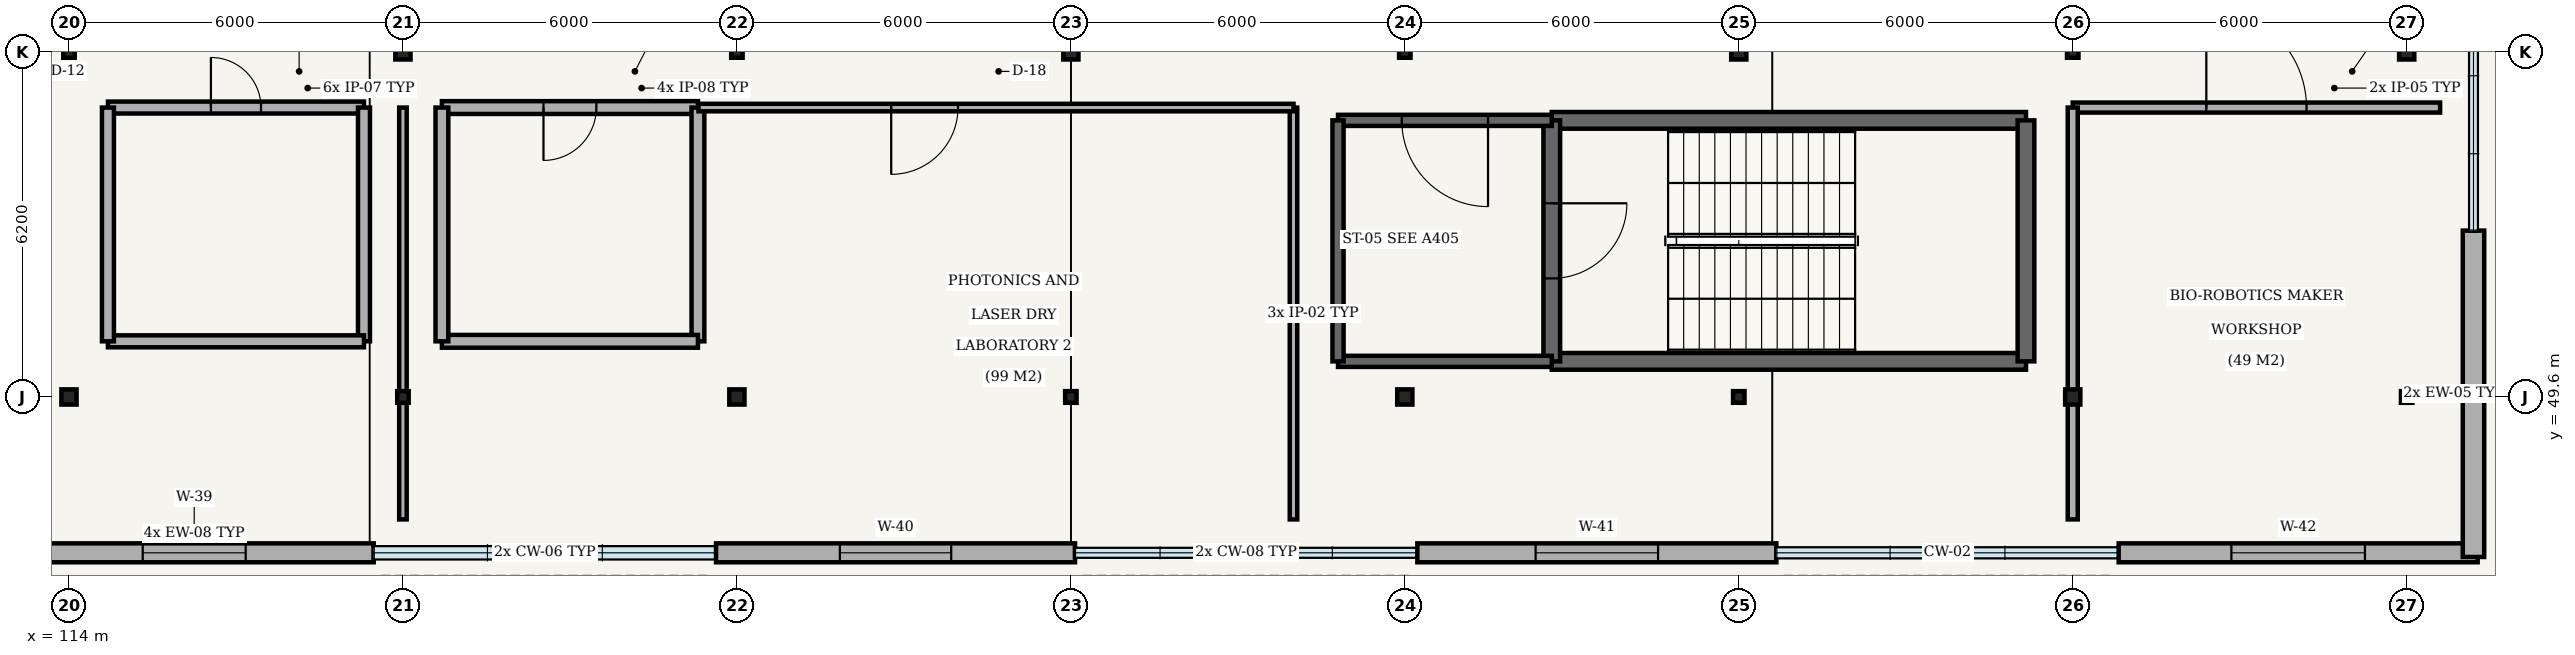
"""IFC4 building model, lengths in metres.
Left out: names, types, materials, properties, quantities, classifications, styles, units other than length and angle.
Written with IfcOpenShell. Run it as: python <this file> out.ifc"""

import sys

from ifc_helpers import new_model, si_unit, direction, frame, frame_2d, origin, origin_2d, place, context, subcontext, project, spatial, rectangle, hollow_circle, i_section, extrude, element, fill, save


model = new_model("IFC4")
c1 = context("Model", 3, precision=1e-05, world=origin(), true_north=direction((0.0, 1.0)))
c2 = subcontext(c1, "Body", "Model", "MODEL_VIEW")
j1 = project(units=[si_unit("LENGTHUNIT", "METRE"), si_unit("PLANEANGLEUNIT", "RADIAN")], contexts=[c1])
p1 = place(None, origin())
s1 = spatial("IfcSite", under=j1, at=p1, CompositionType="ELEMENT")
p2 = place(p1, origin())
s2 = spatial("IfcBuilding", under=s1, at=p2, CompositionType="ELEMENT")
p3 = place(p2, frame((0.0, 0.0, 15.6)))
s3 = spatial("IfcBuildingStorey", under=s2, at=p3, CompositionType="ELEMENT", Elevation=15.6)
p4 = place(p3, frame((114.0, 49.6, 0.0), z_axis=(0.0, 0.0, 1.0), x_axis=(1.0, 0.0, 0.0)))
e1 = element("IfcColumn", 1, at=p4, inside=s3, PredefinedType="COLUMN", context=c2, shape_type="SweptSolid", body=[
    extrude(hollow_circle(Radius=0.136, WallThickness=0.01, at=origin_2d()), origin(), (0.0, 0.0, 1.0), 4.8),
])
for number, where, z_axis, x_axis in (
    (2, (114.0, 55.8, 0.0), (0.0, 0.0, 1.0), (1.0, 0.0, 0.0)),
    (3, (120.0, 49.6, 0.0), (0.0, 0.0, 1.0), (1.0, 0.0, 0.0)),
):
    element("IfcColumn", number, at=place(p3, frame(where, z_axis=z_axis, x_axis=x_axis)), inside=s3, PredefinedType="COLUMN", context=c2, shape_type="SweptSolid", body=[
        extrude(i_section(OverallWidth=0.206, OverallDepth=0.21, WebThickness=0.01, FlangeThickness=0.014, FilletRadius=0.01, at=origin_2d()), origin(), (0.0, 0.0, 1.0), 4.8),
    ])
for number, where, z_axis, x_axis in (
    (4, (120.0, 55.8, 0.0), (0.0, 0.0, 1.0), (1.0, 0.0, 0.0)),
    (5, (126.0, 49.6, 0.0), (0.0, 0.0, 1.0), (1.0, 0.0, 0.0)),
):
    element("IfcColumn", number, at=place(p3, frame(where, z_axis=z_axis, x_axis=x_axis)), inside=s3, PredefinedType="COLUMN", context=c2, shape_type="SweptSolid", body=[
        extrude(hollow_circle(Radius=0.136, WallThickness=0.01, at=origin_2d()), origin(), (0.0, 0.0, 1.0), 4.8),
    ])
for number, where, z_axis, x_axis in (
    (6, (126.0, 55.8, 0.0), (0.0, 0.0, 1.0), (1.0, 0.0, 0.0)),
    (7, (132.0, 49.6, 0.0), (0.0, 0.0, 1.0), (1.0, 0.0, 0.0)),
):
    element("IfcColumn", number, at=place(p3, frame(where, z_axis=z_axis, x_axis=x_axis)), inside=s3, PredefinedType="COLUMN", context=c2, shape_type="SweptSolid", body=[
        extrude(i_section(OverallWidth=0.206, OverallDepth=0.21, WebThickness=0.01, FlangeThickness=0.014, FilletRadius=0.01, at=origin_2d()), origin(), (0.0, 0.0, 1.0), 4.8),
    ])
for number, where, z_axis, x_axis in (
    (8, (132.0, 55.8, 0.0), (0.0, 0.0, 1.0), (1.0, 0.0, 0.0)),
    (9, (138.0, 49.6, 0.0), (0.0, 0.0, 1.0), (1.0, 0.0, 0.0)),
):
    element("IfcColumn", number, at=place(p3, frame(where, z_axis=z_axis, x_axis=x_axis)), inside=s3, PredefinedType="COLUMN", context=c2, shape_type="SweptSolid", body=[
        extrude(hollow_circle(Radius=0.136, WallThickness=0.01, at=origin_2d()), origin(), (0.0, 0.0, 1.0), 4.8),
    ])
for number, where, z_axis, x_axis in (
    (10, (138.0, 55.8, 0.0), (0.0, 0.0, 1.0), (1.0, 0.0, 0.0)),
    (11, (144.0, 49.6, 0.0), (0.0, 0.0, 1.0), (1.0, 0.0, 0.0)),
):
    element("IfcColumn", number, at=place(p3, frame(where, z_axis=z_axis, x_axis=x_axis)), inside=s3, PredefinedType="COLUMN", context=c2, shape_type="SweptSolid", body=[
        extrude(i_section(OverallWidth=0.206, OverallDepth=0.21, WebThickness=0.01, FlangeThickness=0.014, FilletRadius=0.01, at=origin_2d()), origin(), (0.0, 0.0, 1.0), 4.8),
    ])
for number, where, z_axis, x_axis in (
    (12, (144.0, 55.8, 0.0), (0.0, 0.0, 1.0), (1.0, 0.0, 0.0)),
    (13, (150.0, 49.6, 0.0), (0.0, 0.0, 1.0), (1.0, 0.0, 0.0)),
):
    element("IfcColumn", number, at=place(p3, frame(where, z_axis=z_axis, x_axis=x_axis)), inside=s3, PredefinedType="COLUMN", context=c2, shape_type="SweptSolid", body=[
        extrude(hollow_circle(Radius=0.136, WallThickness=0.01, at=origin_2d()), origin(), (0.0, 0.0, 1.0), 4.8),
    ])
p5 = place(p3, frame((150.0, 55.8, 0.0), z_axis=(0.0, 0.0, 1.0), x_axis=(1.0, 0.0, 0.0)))
e14 = element("IfcColumn", 14, at=p5, inside=s3, PredefinedType="COLUMN", context=c2, shape_type="SweptSolid", body=[
    extrude(i_section(OverallWidth=0.206, OverallDepth=0.21, WebThickness=0.01, FlangeThickness=0.014, FilletRadius=0.01, at=origin_2d()), origin(), (0.0, 0.0, 1.0), 4.8),
])
p6 = place(p3, frame((156.0, 49.6, 0.0), z_axis=(0.0, 0.0, 1.0), x_axis=(1.0, 0.0, 0.0)))
e15 = element("IfcColumn", 15, at=p6, inside=s3, PredefinedType="COLUMN", context=c2, shape_type="SweptSolid", body=[
    extrude(i_section(OverallWidth=0.206, OverallDepth=0.21, WebThickness=0.01, FlangeThickness=0.014, FilletRadius=0.01, at=origin_2d()), origin(), (0.0, 0.0, 1.0), 4.55),
])
p7 = place(p3, frame((156.0, 55.8, 0.0), z_axis=(0.0, 0.0, 1.0), x_axis=(1.0, 0.0, 0.0)))
e16 = element("IfcColumn", 16, at=p7, inside=s3, PredefinedType="COLUMN", context=c2, shape_type="SweptSolid", body=[
    extrude(hollow_circle(Radius=0.136, WallThickness=0.01, at=origin_2d()), origin(), (0.0, 0.0, 1.0), 4.55),
])
p8 = place(p3, frame((113.025, 46.8, 0.0), z_axis=(0.0, 0.0, 1.0), x_axis=(1.0, 0.0, 0.0)))
e17 = element("IfcWall", 17, at=p8, inside=s3, PredefinedType="SOLIDWALL", context=c2, shape_type="SweptSolid", body=[
    extrude(rectangle(XDim=6.45, YDim=0.34, at=frame_2d((3.225, 0.0))), origin(), (0.0, 0.0, 1.0), 3.84),
])
p9 = place(p8, frame((2.3, 0.0, 0.9)))
e18 = element("IfcOpeningElement", 18, at=p9, cuts=e17, PredefinedType="OPENING", context=c2, shape_type="SweptSolid", body=[
    extrude(rectangle(XDim=1.85, YDim=1.95, at=frame_2d((0.925, 0.975))), frame((0.0, 0.18, 0.0), z_axis=(0.0, -1.0, 0.0), x_axis=(1.0, 0.0, 0.0)), (0.0, 0.0, 1.0), 0.36),
])
p10 = place(p3, frame((125.625, 46.8, 0.0), z_axis=(0.0, 0.0, 1.0), x_axis=(1.0, 0.0, 0.0)))
e19 = element("IfcWall", 19, at=p10, inside=s3, PredefinedType="SOLIDWALL", context=c2, shape_type="SweptSolid", body=[
    extrude(rectangle(XDim=6.45, YDim=0.34, at=frame_2d((3.225, 0.0))), origin(), (0.0, 0.0, 1.0), 3.84),
])
p11 = place(p10, frame((2.225, 0.0, 0.9)))
e20 = element("IfcOpeningElement", 20, at=p11, cuts=e19, PredefinedType="OPENING", context=c2, shape_type="SweptSolid", body=[
    extrude(rectangle(XDim=2.0, YDim=1.95, at=frame_2d((1.0, 0.975))), frame((0.0, 0.18, 0.0), z_axis=(0.0, -1.0, 0.0), x_axis=(1.0, 0.0, 0.0)), (0.0, 0.0, 1.0), 0.36),
])
p12 = place(p3, frame((138.225, 46.8, 0.0), z_axis=(0.0, 0.0, 1.0), x_axis=(1.0, 0.0, 0.0)))
e21 = element("IfcWall", 21, at=p12, inside=s3, PredefinedType="SOLIDWALL", context=c2, shape_type="SweptSolid", body=[
    extrude(rectangle(XDim=6.45, YDim=0.34, at=frame_2d((3.225, 0.0))), origin(), (0.0, 0.0, 1.0), 3.84),
])
p13 = place(p12, frame((2.125, 0.0, 0.9)))
e22 = element("IfcOpeningElement", 22, at=p13, cuts=e21, PredefinedType="OPENING", context=c2, shape_type="SweptSolid", body=[
    extrude(rectangle(XDim=2.2, YDim=1.95, at=frame_2d((1.1, 0.975))), frame((0.0, 0.18, 0.0), z_axis=(0.0, -1.0, 0.0), x_axis=(1.0, 0.0, 0.0)), (0.0, 0.0, 1.0), 0.36),
])
p14 = place(p3, frame((150.825, 46.8, 0.0), z_axis=(0.0, 0.0, 1.0), x_axis=(1.0, 0.0, 0.0)))
e23 = element("IfcWall", 23, at=p14, inside=s3, PredefinedType="SOLIDWALL", context=c2, shape_type="SweptSolid", body=[
    extrude(rectangle(XDim=6.45, YDim=0.34, at=frame_2d((3.225, 0.0))), origin(), (0.0, 0.0, 1.0), 3.84),
])
p15 = place(p14, frame((2.025, 0.0, 0.9)))
e24 = element("IfcOpeningElement", 24, at=p15, cuts=e23, PredefinedType="OPENING", context=c2, shape_type="SweptSolid", body=[
    extrude(rectangle(XDim=2.4, YDim=1.95, at=frame_2d((1.2, 0.975))), frame((0.0, 0.18, 0.0), z_axis=(0.0, -1.0, 0.0), x_axis=(1.0, 0.0, 0.0)), (0.0, 0.0, 1.0), 0.36),
])
p16 = place(p3, frame((157.2, 46.725, 0.0), z_axis=(0.0, 0.0, 1.0), x_axis=(0.0, 1.0, 0.0)))
e25 = element("IfcWall", 25, at=p16, inside=s3, PredefinedType="SOLIDWALL", context=c2, shape_type="SweptSolid", body=[
    extrude(rectangle(XDim=5.864, YDim=0.385, at=frame_2d((2.932, 0.0))), origin(), (0.0, 0.0, 1.0), 3.84),
])
for number, where, z_axis, x_axis in (
    (26, (140.64, 50.24, 0.0), (0.0, 0.0, 1.0), (1.0, 0.0, 0.0)),
    (27, (149.16, 54.57, 0.0), (0.0, 0.0, 1.0), (-1.0, 0.0, 0.0)),
):
    element("IfcWall", number, at=place(p3, frame(where, z_axis=z_axis, x_axis=x_axis)), inside=s3, PredefinedType="SHEAR", context=c2, shape_type="SweptSolid", body=[
        extrude(rectangle(XDim=8.52, YDim=0.3, at=frame_2d((4.26, 0.0))), origin(), (0.0, 0.0, 1.0), 4.55),
    ])
p17 = place(p3, frame((140.64, 54.57, 0.0), z_axis=(0.0, 0.0, 1.0), x_axis=(0.0, -1.0, 0.0)))
e28 = element("IfcWall", 28, at=p17, inside=s3, PredefinedType="SHEAR", context=c2, shape_type="SweptSolid", body=[
    extrude(rectangle(XDim=4.33, YDim=0.3, at=frame_2d((2.165, 0.0))), origin(), (0.0, 0.0, 1.0), 4.55),
])
p18 = place(p17, frame((1.49, 0.0, 0.0)))
e29 = element("IfcOpeningElement", 29, at=p18, cuts=e28, PredefinedType="OPENING", context=c2, shape_type="SweptSolid", body=[
    extrude(rectangle(XDim=1.35, YDim=2.2, at=frame_2d((0.675, 1.1))), frame((0.0, 0.16, 0.0), z_axis=(0.0, -1.0, 0.0), x_axis=(1.0, 0.0, 0.0)), (0.0, 0.0, 1.0), 0.32),
])
p19 = place(p3, frame((149.16, 50.24, 0.0), z_axis=(0.0, 0.0, 1.0), x_axis=(0.0, 1.0, 0.0)))
e30 = element("IfcWall", 30, at=p19, inside=s3, PredefinedType="SHEAR", context=c2, shape_type="SweptSolid", body=[
    extrude(rectangle(XDim=4.33, YDim=0.3, at=frame_2d((2.165, 0.0))), origin(), (0.0, 0.0, 1.0), 4.55),
])
p20 = place(p3, frame((136.8, 50.24, 0.0), z_axis=(0.0, 0.0, 1.0), x_axis=(1.0, 0.0, 0.0)))
e31 = element("IfcWall", 31, at=p20, inside=s3, PredefinedType="SHEAR", context=c2, shape_type="SweptSolid", body=[
    extrude(rectangle(XDim=3.84, YDim=0.2, at=frame_2d((1.92, 0.0))), origin(), (0.0, 0.0, 1.0), 4.55),
])
p21 = place(p3, frame((140.64, 54.57, 0.0), z_axis=(0.0, 0.0, 1.0), x_axis=(-1.0, 0.0, 0.0)))
e32 = element("IfcWall", 32, at=p21, inside=s3, PredefinedType="SHEAR", context=c2, shape_type="SweptSolid", body=[
    extrude(rectangle(XDim=3.84, YDim=0.2, at=frame_2d((1.92, 0.0))), origin(), (0.0, 0.0, 1.0), 4.55),
])
p22 = place(p21, frame((1.145, 0.0, 0.0)))
e33 = element("IfcOpeningElement", 33, at=p22, cuts=e32, PredefinedType="OPENING", context=c2, shape_type="SweptSolid", body=[
    extrude(rectangle(XDim=1.55, YDim=2.2, at=frame_2d((0.775, 1.1))), frame((0.0, 0.11, 0.0), z_axis=(0.0, -1.0, 0.0), x_axis=(1.0, 0.0, 0.0)), (0.0, 0.0, 1.0), 0.22),
])
p23 = place(p3, frame((136.8, 54.57, 0.0), z_axis=(0.0, 0.0, 1.0), x_axis=(0.0, -1.0, 0.0)))
e34 = element("IfcWall", 34, at=p23, inside=s3, PredefinedType="SHEAR", context=c2, shape_type="SweptSolid", body=[
    extrude(rectangle(XDim=4.33, YDim=0.2, at=frame_2d((2.165, 0.0))), origin(), (0.0, 0.0, 1.0), 4.55),
])
p24 = place(p3, frame((114.7, 54.8, 0.0), z_axis=(0.0, 0.0, 1.0), x_axis=(1.0, 0.0, 0.0)))
e35 = element("IfcWall", 35, at=p24, inside=s3, PredefinedType="PARTITIONING", context=c2, shape_type="SweptSolid", body=[
    extrude(rectangle(XDim=4.6, YDim=0.215, at=frame_2d((2.3, 0.0))), origin(), (0.0, 0.0, 1.0), 3.75),
])
p25 = place(p24, frame((1.85, 0.0, 0.0)))
e36 = element("IfcOpeningElement", 36, at=p25, cuts=e35, PredefinedType="OPENING", context=c2, shape_type="SweptSolid", body=[
    extrude(rectangle(XDim=0.9, YDim=2.25, at=frame_2d((0.45, 1.125))), frame((0.0, 0.117, 0.0), z_axis=(0.0, -1.0, 0.0), x_axis=(1.0, 0.0, 0.0)), (0.0, 0.0, 1.0), 0.235),
])
p26 = place(p3, frame((119.3, 54.8, 0.0), z_axis=(0.0, 0.0, 1.0), x_axis=(0.0, -1.0, 0.0)))
e37 = element("IfcWall", 37, at=p26, inside=s3, PredefinedType="PARTITIONING", context=c2, shape_type="SweptSolid", body=[
    extrude(rectangle(XDim=4.2, YDim=0.215, at=frame_2d((2.1, 0.0))), origin(), (0.0, 0.0, 1.0), 3.75),
])
p27 = place(p3, frame((119.3, 50.6, 0.0), z_axis=(0.0, 0.0, 1.0), x_axis=(-1.0, 0.0, 0.0)))
e38 = element("IfcWall", 38, at=p27, inside=s3, PredefinedType="PARTITIONING", context=c2, shape_type="SweptSolid", body=[
    extrude(rectangle(XDim=4.6, YDim=0.215, at=frame_2d((2.3, 0.0))), origin(), (0.0, 0.0, 1.0), 3.75),
])
p28 = place(p3, frame((114.7, 50.6, 0.0), z_axis=(0.0, 0.0, 1.0), x_axis=(0.0, 1.0, 0.0)))
e39 = element("IfcWall", 39, at=p28, inside=s3, PredefinedType="PARTITIONING", context=c2, shape_type="SweptSolid", body=[
    extrude(rectangle(XDim=4.2, YDim=0.215, at=frame_2d((2.1, 0.0))), origin(), (0.0, 0.0, 1.0), 3.75),
])
p29 = place(p3, frame((120.7, 54.8, 0.0), z_axis=(0.0, 0.0, 1.0), x_axis=(1.0, 0.0, 0.0)))
e40 = element("IfcWall", 40, at=p29, inside=s3, PredefinedType="PARTITIONING", context=c2, shape_type="SweptSolid", body=[
    extrude(rectangle(XDim=4.6, YDim=0.23, at=frame_2d((2.3, 0.0))), origin(), (0.0, 0.0, 1.0), 3.75),
])
p30 = place(p29, frame((1.825, 0.0, 0.0)))
e41 = element("IfcOpeningElement", 41, at=p30, cuts=e40, PredefinedType="OPENING", context=c2, shape_type="SweptSolid", body=[
    extrude(rectangle(XDim=0.95, YDim=2.25, at=frame_2d((0.475, 1.125))), frame((0.0, 0.125, 0.0), z_axis=(0.0, -1.0, 0.0), x_axis=(1.0, 0.0, 0.0)), (0.0, 0.0, 1.0), 0.25),
])
p31 = place(p3, frame((125.3, 54.8, 0.0), z_axis=(0.0, 0.0, 1.0), x_axis=(0.0, -1.0, 0.0)))
e42 = element("IfcWall", 42, at=p31, inside=s3, PredefinedType="PARTITIONING", context=c2, shape_type="SweptSolid", body=[
    extrude(rectangle(XDim=4.2, YDim=0.23, at=frame_2d((2.1, 0.0))), origin(), (0.0, 0.0, 1.0), 3.75),
])
p32 = place(p3, frame((125.3, 50.6, 0.0), z_axis=(0.0, 0.0, 1.0), x_axis=(-1.0, 0.0, 0.0)))
e43 = element("IfcWall", 43, at=p32, inside=s3, PredefinedType="PARTITIONING", context=c2, shape_type="SweptSolid", body=[
    extrude(rectangle(XDim=4.6, YDim=0.23, at=frame_2d((2.3, 0.0))), origin(), (0.0, 0.0, 1.0), 3.75),
])
p33 = place(p3, frame((120.7, 50.6, 0.0), z_axis=(0.0, 0.0, 1.0), x_axis=(0.0, 1.0, 0.0)))
e44 = element("IfcWall", 44, at=p33, inside=s3, PredefinedType="PARTITIONING", context=c2, shape_type="SweptSolid", body=[
    extrude(rectangle(XDim=4.2, YDim=0.23, at=frame_2d((2.1, 0.0))), origin(), (0.0, 0.0, 1.0), 3.75),
])
for number, where, z_axis, x_axis in (
    (45, (136.0, 54.8, 0.0), (0.0, 0.0, 1.0), (0.0, -1.0, 0.0)),
    (46, (120.0, 47.4, 0.0), (0.0, 0.0, 1.0), (0.0, 1.0, 0.0)),
):
    element("IfcWall", number, at=place(p3, frame(where, z_axis=z_axis, x_axis=x_axis)), inside=s3, PredefinedType="PARTITIONING", context=c2, shape_type="SweptSolid", body=[
        extrude(rectangle(XDim=7.4, YDim=0.135, at=frame_2d((3.7, 0.0))), origin(), (0.0, 0.0, 1.0), 3.75),
    ])
p34 = place(p3, frame((125.31, 54.8, 0.0), z_axis=(0.0, 0.0, 1.0), x_axis=(1.0, 0.0, 0.0)))
e47 = element("IfcWall", 47, at=p34, inside=s3, PredefinedType="PARTITIONING", context=c2, shape_type="SweptSolid", body=[
    extrude(rectangle(XDim=10.69, YDim=0.135, at=frame_2d((5.345, 0.0))), origin(), (0.0, 0.0, 1.0), 3.75),
])
p35 = place(p34, frame((3.462, 0.0, 0.0)))
e48 = element("IfcOpeningElement", 48, at=p35, cuts=e47, PredefinedType="OPENING", context=c2, shape_type="SweptSolid", body=[
    extrude(rectangle(XDim=1.2, YDim=2.25, at=frame_2d((0.6, 1.125))), frame((0.0, 0.077, 0.0), z_axis=(0.0, -1.0, 0.0), x_axis=(1.0, 0.0, 0.0)), (0.0, 0.0, 1.0), 0.155),
])
p36 = place(p3, frame((150.0, 54.8, 0.0), z_axis=(0.0, 0.0, 1.0), x_axis=(1.0, 0.0, 0.0)))
e49 = element("IfcWall", 49, at=p36, inside=s3, PredefinedType="PARTITIONING", context=c2, shape_type="SweptSolid", body=[
    extrude(rectangle(XDim=6.6, YDim=0.18, at=frame_2d((3.3, 0.0))), origin(), (0.0, 0.0, 1.0), 3.75),
])
p37 = place(p36, frame((2.4, 0.0, 0.0)))
e50 = element("IfcOpeningElement", 50, at=p37, cuts=e49, PredefinedType="OPENING", context=c2, shape_type="SweptSolid", body=[
    extrude(rectangle(XDim=1.8, YDim=2.25, at=frame_2d((0.9, 1.125))), frame((0.0, 0.1, 0.0), z_axis=(0.0, -1.0, 0.0), x_axis=(1.0, 0.0, 0.0)), (0.0, 0.0, 1.0), 0.2),
])
p38 = place(p3, frame((150.0, 47.4, 0.0), z_axis=(0.0, 0.0, 1.0), x_axis=(0.0, 1.0, 0.0)))
e51 = element("IfcWall", 51, at=p38, inside=s3, PredefinedType="PARTITIONING", context=c2, shape_type="SweptSolid", body=[
    extrude(rectangle(XDim=7.4, YDim=0.18, at=frame_2d((3.7, 0.0))), origin(), (0.0, 0.0, 1.0), 3.75),
])
p39 = place(p9, origin())
e52 = element("IfcWindow", 52, at=p39, inside=s3, PartitioningType="DOUBLE_PANEL_VERTICAL", PredefinedType="WINDOW", context=c2, shape_type="SweptSolid", body=[
    extrude(rectangle(XDim=1.85, YDim=1.95, at=frame_2d((0.925, 0.975))), frame((0.0, 0.03, 0.0), z_axis=(0.0, -1.0, 0.0), x_axis=(1.0, 0.0, 0.0)), (0.0, 0.0, 1.0), 0.06),
])
fill(e18, e52)
p40 = place(p11, origin())
e53 = element("IfcWindow", 53, at=p40, inside=s3, PartitioningType="DOUBLE_PANEL_VERTICAL", PredefinedType="WINDOW", context=c2, shape_type="SweptSolid", body=[
    extrude(rectangle(XDim=2.0, YDim=1.95, at=frame_2d((1.0, 0.975))), frame((0.0, 0.03, 0.0), z_axis=(0.0, -1.0, 0.0), x_axis=(1.0, 0.0, 0.0)), (0.0, 0.0, 1.0), 0.06),
])
fill(e20, e53)
p41 = place(p13, origin())
e54 = element("IfcWindow", 54, at=p41, inside=s3, PartitioningType="DOUBLE_PANEL_VERTICAL", PredefinedType="WINDOW", context=c2, shape_type="SweptSolid", body=[
    extrude(rectangle(XDim=2.2, YDim=1.95, at=frame_2d((1.1, 0.975))), frame((0.0, 0.03, 0.0), z_axis=(0.0, -1.0, 0.0), x_axis=(1.0, 0.0, 0.0)), (0.0, 0.0, 1.0), 0.06),
])
fill(e22, e54)
p42 = place(p15, origin())
e55 = element("IfcWindow", 55, at=p42, inside=s3, PartitioningType="DOUBLE_PANEL_VERTICAL", PredefinedType="WINDOW", context=c2, shape_type="SweptSolid", body=[
    extrude(rectangle(XDim=2.4, YDim=1.95, at=frame_2d((1.2, 0.975))), frame((0.0, 0.03, 0.0), z_axis=(0.0, -1.0, 0.0), x_axis=(1.0, 0.0, 0.0)), (0.0, 0.0, 1.0), 0.06),
])
fill(e24, e55)
p43 = place(p18, origin())
e56 = element("IfcDoor", 56, at=p43, inside=s3, OperationType="SINGLE_SWING_LEFT", PredefinedType="DOOR", context=c2, shape_type="SweptSolid", body=[
    extrude(rectangle(XDim=1.35, YDim=2.2, at=frame_2d((0.675, 1.1))), frame((0.0, 0.025, 0.0), z_axis=(0.0, -1.0, 0.0), x_axis=(1.0, 0.0, 0.0)), (0.0, 0.0, 1.0), 0.05),
])
fill(e29, e56)
p44 = place(p22, origin())
e57 = element("IfcDoor", 57, at=p44, inside=s3, OperationType="SINGLE_SWING_LEFT", PredefinedType="DOOR", context=c2, shape_type="SweptSolid", body=[
    extrude(rectangle(XDim=1.55, YDim=2.2, at=frame_2d((0.775, 1.1))), frame((0.0, 0.025, 0.0), z_axis=(0.0, -1.0, 0.0), x_axis=(1.0, 0.0, 0.0)), (0.0, 0.0, 1.0), 0.05),
])
fill(e33, e57)
p45 = place(p25, origin())
e58 = element("IfcDoor", 58, at=p45, inside=s3, OperationType="SINGLE_SWING_LEFT", PredefinedType="DOOR", context=c2, shape_type="SweptSolid", body=[
    extrude(rectangle(XDim=0.9, YDim=2.25, at=frame_2d((0.45, 1.125))), frame((0.0, 0.025, 0.0), z_axis=(0.0, -1.0, 0.0), x_axis=(1.0, 0.0, 0.0)), (0.0, 0.0, 1.0), 0.05),
])
fill(e36, e58)
p46 = place(p30, origin())
e59 = element("IfcDoor", 59, at=p46, inside=s3, OperationType="SINGLE_SWING_RIGHT", PredefinedType="DOOR", context=c2, shape_type="SweptSolid", body=[
    extrude(rectangle(XDim=0.95, YDim=2.25, at=frame_2d((0.475, 1.125))), frame((0.0, 0.025, 0.0), z_axis=(0.0, -1.0, 0.0), x_axis=(1.0, 0.0, 0.0)), (0.0, 0.0, 1.0), 0.05),
])
fill(e41, e59)
p47 = place(p35, origin())
e60 = element("IfcDoor", 60, at=p47, inside=s3, OperationType="SINGLE_SWING_RIGHT", PredefinedType="DOOR", context=c2, shape_type="SweptSolid", body=[
    extrude(rectangle(XDim=1.2, YDim=2.25, at=frame_2d((0.6, 1.125))), frame((0.0, 0.025, 0.0), z_axis=(0.0, -1.0, 0.0), x_axis=(1.0, 0.0, 0.0)), (0.0, 0.0, 1.0), 0.05),
])
fill(e48, e60)
p48 = place(p37, origin())
e61 = element("IfcDoor", 61, at=p48, inside=s3, OperationType="DOUBLE_DOOR_SINGLE_SWING", PredefinedType="DOOR", context=c2, shape_type="SweptSolid", body=[
    extrude(rectangle(XDim=1.8, YDim=2.25, at=frame_2d((0.9, 1.125))), frame((0.0, 0.025, 0.0), z_axis=(0.0, -1.0, 0.0), x_axis=(1.0, 0.0, 0.0)), (0.0, 0.0, 1.0), 0.05),
])
fill(e50, e61)
save(model, sys.argv[1])
